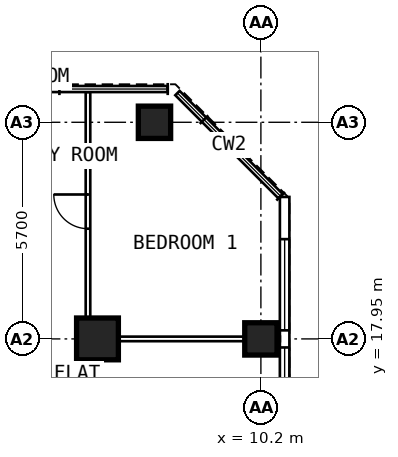
"""IFC4 building model, lengths in metres.
Left out: names, types, materials, properties, quantities, classifications, styles, units other than length and angle.
Written with IfcOpenShell. Run it as: python <this file> out.ifc"""

import sys

from ifc_helpers import new_model, si_unit, direction, frame, frame_2d, origin, origin_2d, place, context, subcontext, project, spatial, rectangle, extrude, element, fill, save


model = new_model("IFC4")
c1 = context("Model", 3, precision=1e-05, world=origin(), true_north=direction((0.0, 1.0)))
c2 = subcontext(c1, "Body", "Model", "MODEL_VIEW")
j1 = project(units=[si_unit("LENGTHUNIT", "METRE"), si_unit("PLANEANGLEUNIT", "RADIAN")], contexts=[c1])
p1 = place(None, origin())
s1 = spatial("IfcSite", under=j1, at=p1, CompositionType="ELEMENT")
p2 = place(p1, origin())
s2 = spatial("IfcBuilding", under=s1, at=p2, CompositionType="ELEMENT")
p3 = place(p2, frame((0.0, 0.0, 246.0)))
s3 = spatial("IfcBuildingStorey", under=s2, at=p3, CompositionType="ELEMENT", Elevation=246.0)
for number, where, z_axis, x_axis in (
    (1, (10.2, 17.95, 0.0), (0.0, 0.0, 1.0), (0.0, 1.0, 0.0)),
    (2, (7.4, 23.65, 0.0), (0.0, 0.0, 1.0), (0.0, 1.0, 0.0)),
):
    element("IfcColumn", number, at=place(p3, frame(where, z_axis=z_axis, x_axis=x_axis)), inside=s3, PredefinedType="COLUMN", context=c2, shape_type="SweptSolid", body=[
        extrude(rectangle(XDim=0.85, YDim=0.85, at=origin_2d()), origin(), (0.0, 0.0, 1.0), 3.6),
    ])
p4 = place(p3, frame((5.9, 17.95, 0.0), z_axis=(0.0, 0.0, 1.0), x_axis=(0.0, 1.0, 0.0)))
e3 = element("IfcColumn", 3, at=p4, inside=s3, PredefinedType="COLUMN", context=c2, shape_type="SweptSolid", body=[
    extrude(rectangle(XDim=1.1, YDim=1.1, at=origin_2d()), origin(), (0.0, 0.0, 1.0), 3.6),
])
p5 = place(p3, frame((10.825, 6.409, 0.0), z_axis=(0.0, 0.0, 1.0), x_axis=(0.0, 1.0, 0.0)))
e4 = element("IfcWall", 4, at=p5, inside=s3, PredefinedType="SOLIDWALL", context=c2, shape_type="SweptSolid", body=[
    extrude(rectangle(XDim=15.276, YDim=0.25, at=frame_2d((7.638, 0.0))), origin(), (0.0, 0.0, 1.0), 3.35),
])
p6 = place(p5, frame((0.366, 0.0, 0.8)))
e5 = element("IfcOpeningElement", 5, at=p6, cuts=e4, PredefinedType="OPENING", context=c2, shape_type="SweptSolid", body=[
    extrude(rectangle(XDim=2.4, YDim=1.8, at=frame_2d((1.2, 0.9))), frame((0.0, 0.137, 0.0), z_axis=(0.0, -1.0, 0.0), x_axis=(1.0, 0.0, 0.0)), (0.0, 0.0, 1.0), 0.274),
])
p7 = place(p5, frame((3.216, 0.0, 0.8)))
e6 = element("IfcOpeningElement", 6, at=p7, cuts=e4, PredefinedType="OPENING", context=c2, shape_type="SweptSolid", body=[
    extrude(rectangle(XDim=2.4, YDim=1.8, at=frame_2d((1.2, 0.9))), frame((0.0, 0.137, 0.0), z_axis=(0.0, -1.0, 0.0), x_axis=(1.0, 0.0, 0.0)), (0.0, 0.0, 1.0), 0.274),
])
p8 = place(p5, frame((6.066, 0.0, 0.8)))
e7 = element("IfcOpeningElement", 7, at=p8, cuts=e4, PredefinedType="OPENING", context=c2, shape_type="SweptSolid", body=[
    extrude(rectangle(XDim=2.4, YDim=1.8, at=frame_2d((1.2, 0.9))), frame((0.0, 0.137, 0.0), z_axis=(0.0, -1.0, 0.0), x_axis=(1.0, 0.0, 0.0)), (0.0, 0.0, 1.0), 0.274),
])
p9 = place(p5, frame((8.916, 0.0, 0.8)))
e8 = element("IfcOpeningElement", 8, at=p9, cuts=e4, PredefinedType="OPENING", context=c2, shape_type="SweptSolid", body=[
    extrude(rectangle(XDim=2.4, YDim=1.8, at=frame_2d((1.2, 0.9))), frame((0.0, 0.137, 0.0), z_axis=(0.0, -1.0, 0.0), x_axis=(1.0, 0.0, 0.0)), (0.0, 0.0, 1.0), 0.274),
])
p10 = place(p5, frame((11.766, 0.0, 0.8)))
e9 = element("IfcOpeningElement", 9, at=p10, cuts=e4, PredefinedType="OPENING", context=c2, shape_type="SweptSolid", body=[
    extrude(rectangle(XDim=2.4, YDim=1.8, at=frame_2d((1.2, 0.9))), frame((0.0, 0.137, 0.0), z_axis=(0.0, -1.0, 0.0), x_axis=(1.0, 0.0, 0.0)), (0.0, 0.0, 1.0), 0.274),
])
p11 = place(p3, frame((5.65, 9.6, 0.0), z_axis=(0.0, 0.0, 1.0), x_axis=(0.0, 1.0, 0.0)))
e10 = element("IfcWall", 10, at=p11, inside=s3, PredefinedType="PARTITIONING", context=c2, shape_type="SweptSolid", body=[
    extrude(rectangle(XDim=14.845, YDim=0.12, at=frame_2d((7.422, 0.0))), origin(), (0.0, 0.0, 1.0), 3.35),
])
p12 = place(p11, frame((5.05, 0.0, 0.0)))
e11 = element("IfcOpeningElement", 11, at=p12, cuts=e10, PredefinedType="OPENING", context=c2, shape_type="SweptSolid", body=[
    extrude(rectangle(XDim=0.9, YDim=2.1, at=frame_2d((0.45, 1.05))), frame((0.0, 0.072, 0.0), z_axis=(0.0, -1.0, 0.0), x_axis=(1.0, 0.0, 0.0)), (0.0, 0.0, 1.0), 0.144),
])
p13 = place(p11, frame((11.25, 0.0, 0.0)))
e12 = element("IfcOpeningElement", 12, at=p13, cuts=e10, PredefinedType="OPENING", context=c2, shape_type="SweptSolid", body=[
    extrude(rectangle(XDim=0.9, YDim=2.1, at=frame_2d((0.45, 1.05))), frame((0.0, 0.072, 0.0), z_axis=(0.0, -1.0, 0.0), x_axis=(1.0, 0.0, 0.0)), (0.0, 0.0, 1.0), 0.144),
])
p14 = place(p3, frame((5.71, 17.95, 0.0), z_axis=(0.0, 0.0, 1.0), x_axis=(1.0, 0.0, 0.0)))
e13 = element("IfcWall", 13, at=p14, inside=s3, PredefinedType="PARTITIONING", context=c2, shape_type="SweptSolid", body=[
    extrude(rectangle(XDim=4.99, YDim=0.12, at=frame_2d((2.495, 0.0))), origin(), (0.0, 0.0, 1.0), 2.45),
])
p15 = place(p9, origin())
e14 = element("IfcWindow", 14, at=p15, inside=s3, PartitioningType="SINGLE_PANEL", PredefinedType="WINDOW", context=c2, shape_type="SweptSolid", body=[
    extrude(rectangle(XDim=2.4, YDim=1.8, at=frame_2d((1.2, 0.9))), frame((0.0, 0.03, 0.0), z_axis=(0.0, -1.0, 0.0), x_axis=(1.0, 0.0, 0.0)), (0.0, 0.0, 1.0), 0.06),
])
fill(e8, e14)
p16 = place(p10, origin())
e15 = element("IfcWindow", 15, at=p16, inside=s3, PartitioningType="SINGLE_PANEL", PredefinedType="WINDOW", context=c2, shape_type="SweptSolid", body=[
    extrude(rectangle(XDim=2.4, YDim=1.8, at=frame_2d((1.2, 0.9))), frame((0.0, 0.03, 0.0), z_axis=(0.0, -1.0, 0.0), x_axis=(1.0, 0.0, 0.0)), (0.0, 0.0, 1.0), 0.06),
])
fill(e9, e15)
p17 = place(p13, origin())
e16 = element("IfcDoor", 16, at=p17, inside=s3, OperationType="SINGLE_SWING_RIGHT", PredefinedType="DOOR", context=c2, shape_type="SweptSolid", body=[
    extrude(rectangle(XDim=0.9, YDim=2.1, at=frame_2d((0.45, 1.05))), frame((0.0, 0.025, 0.0), z_axis=(0.0, -1.0, 0.0), x_axis=(1.0, 0.0, 0.0)), (0.0, 0.0, 1.0), 0.05),
])
fill(e12, e16)
save(model, sys.argv[1])
